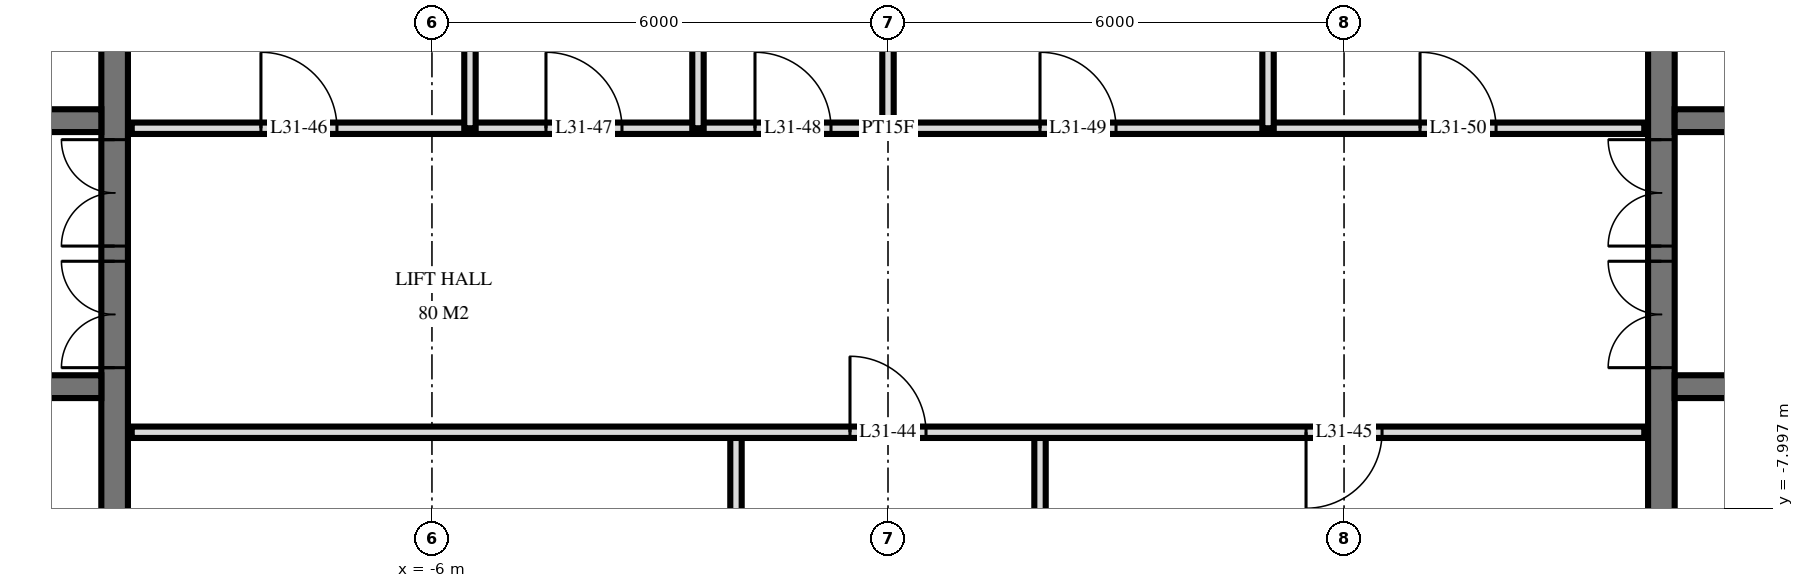
"""IFC4 building model, lengths in metres.
Left out: names, types, materials, properties, quantities, classifications, styles, units other than length and angle.
Written with IfcOpenShell. Run it as: python <this file> out.ifc"""

import sys

from ifc_helpers import new_model, si_unit, direction, frame, frame_2d, origin, place, context, subcontext, project, spatial, rectangle, extrude, element, fill, save


model = new_model("IFC4")
c1 = context("Model", 3, precision=1e-05, world=origin(), true_north=direction((0.0, 1.0)))
c2 = subcontext(c1, "Body", "Model", "MODEL_VIEW")
j1 = project(units=[si_unit("LENGTHUNIT", "METRE"), si_unit("PLANEANGLEUNIT", "RADIAN")], contexts=[c1])
p1 = place(None, origin())
s1 = spatial("IfcSite", under=j1, at=p1, CompositionType="ELEMENT")
p2 = place(p1, origin())
s2 = spatial("IfcBuilding", under=s1, at=p2, CompositionType="ELEMENT")
p3 = place(p2, frame((0.0, 0.0, 123.6)))
s3 = spatial("IfcBuildingStorey", under=s2, at=p3, CompositionType="ELEMENT", Elevation=123.6)
p4 = place(p3, frame((-10.175, -14.55, 0.0), z_axis=(0.0, 0.0, 1.0), x_axis=(0.0, 1.0, 0.0)))
e1 = element("IfcWall", 1, at=p4, inside=s3, PredefinedType="SHEAR", context=c2, shape_type="SweptSolid", body=[
    extrude(rectangle(XDim=14.1, YDim=0.35, at=frame_2d((7.05, 0.0))), origin(), (0.0, 0.0, 1.0), 3.6),
])
p5 = place(p4, frame((8.4, 0.0, 0.0)))
e2 = element("IfcOpeningElement", 2, at=p5, cuts=e1, PredefinedType="OPENING", context=c2, shape_type="SweptSolid", body=[
    extrude(rectangle(XDim=1.4, YDim=2.4, at=frame_2d((0.7, 1.2))), frame((0.0, 0.185, 0.0), z_axis=(0.0, -1.0, 0.0), x_axis=(1.0, 0.0, 0.0)), (0.0, 0.0, 1.0), 0.37),
])
p6 = place(p4, frame((10.0, 0.0, 0.0)))
e3 = element("IfcOpeningElement", 3, at=p6, cuts=e1, PredefinedType="OPENING", context=c2, shape_type="SweptSolid", body=[
    extrude(rectangle(XDim=1.4, YDim=2.4, at=frame_2d((0.7, 1.2))), frame((0.0, 0.185, 0.0), z_axis=(0.0, -1.0, 0.0), x_axis=(1.0, 0.0, 0.0)), (0.0, 0.0, 1.0), 0.37),
])
p7 = place(p4, frame((4.0, 0.0, 0.0)))
e4 = element("IfcOpeningElement", 4, at=p7, cuts=e1, PredefinedType="OPENING", context=c2, shape_type="SweptSolid", body=[
    extrude(rectangle(XDim=1.2, YDim=2.1, at=frame_2d((0.6, 1.05))), frame((0.0, 0.185, 0.0), z_axis=(0.0, -1.0, 0.0), x_axis=(1.0, 0.0, 0.0)), (0.0, 0.0, 1.0), 0.37),
])
p8 = place(p3, frame((-24.05, -2.9, 0.0), z_axis=(0.0, 0.0, 1.0), x_axis=(1.0, 0.0, 0.0)))
e5 = element("IfcWall", 5, at=p8, inside=s3, PredefinedType="SHEAR", context=c2, shape_type="SweptSolid", body=[
    extrude(rectangle(XDim=13.7, YDim=0.3, at=frame_2d((6.85, 0.0))), origin(), (0.0, 0.0, 1.0), 3.6),
])
p9 = place(p8, frame((0.55, 0.0, 0.0)))
e6 = element("IfcOpeningElement", 6, at=p9, cuts=e5, PredefinedType="OPENING", context=c2, shape_type="SweptSolid", body=[
    extrude(rectangle(XDim=1.1, YDim=2.1, at=frame_2d((0.55, 1.05))), frame((0.0, 0.16, 0.0), z_axis=(0.0, -1.0, 0.0), x_axis=(1.0, 0.0, 0.0)), (0.0, 0.0, 1.0), 0.32),
])
p10 = place(p8, frame((6.863, 0.0, 0.0)))
e7 = element("IfcOpeningElement", 7, at=p10, cuts=e5, PredefinedType="OPENING", context=c2, shape_type="SweptSolid", body=[
    extrude(rectangle(XDim=0.9, YDim=2.1, at=frame_2d((0.45, 1.05))), frame((0.0, 0.16, 0.0), z_axis=(0.0, -1.0, 0.0), x_axis=(1.0, 0.0, 0.0)), (0.0, 0.0, 1.0), 0.32),
])
p11 = place(p8, frame((5.438, 0.0, 0.0)))
e8 = element("IfcOpeningElement", 8, at=p11, cuts=e5, PredefinedType="OPENING", context=c2, shape_type="SweptSolid", body=[
    extrude(rectangle(XDim=0.9, YDim=2.1, at=frame_2d((0.45, 1.05))), frame((0.0, 0.16, 0.0), z_axis=(0.0, -1.0, 0.0), x_axis=(1.0, 0.0, 0.0)), (0.0, 0.0, 1.0), 0.32),
])
p12 = place(p8, frame((11.85, 0.0, 0.0)))
e9 = element("IfcOpeningElement", 9, at=p12, cuts=e5, PredefinedType="OPENING", context=c2, shape_type="SweptSolid", body=[
    extrude(rectangle(XDim=1.0, YDim=2.1, at=frame_2d((0.5, 1.05))), frame((0.0, 0.16, 0.0), z_axis=(0.0, -1.0, 0.0), x_axis=(1.0, 0.0, 0.0)), (0.0, 0.0, 1.0), 0.32),
])
p13 = place(p8, frame((9.562, 0.0, 0.0)))
e10 = element("IfcOpeningElement", 10, at=p13, cuts=e5, PredefinedType="OPENING", context=c2, shape_type="SweptSolid", body=[
    extrude(rectangle(XDim=1.0, YDim=2.1, at=frame_2d((0.5, 1.05))), frame((0.0, 0.16, 0.0), z_axis=(0.0, -1.0, 0.0), x_axis=(1.0, 0.0, 0.0)), (0.0, 0.0, 1.0), 0.32),
])
p14 = place(p8, frame((8.137, 0.0, 0.0)))
e11 = element("IfcOpeningElement", 11, at=p14, cuts=e5, PredefinedType="OPENING", context=c2, shape_type="SweptSolid", body=[
    extrude(rectangle(XDim=1.0, YDim=2.1, at=frame_2d((0.5, 1.05))), frame((0.0, 0.16, 0.0), z_axis=(0.0, -1.0, 0.0), x_axis=(1.0, 0.0, 0.0)), (0.0, 0.0, 1.0), 0.32),
])
p15 = place(p8, frame((3.0, 0.0, 0.0)))
e12 = element("IfcOpeningElement", 12, at=p15, cuts=e5, PredefinedType="OPENING", context=c2, shape_type="SweptSolid", body=[
    extrude(rectangle(XDim=1.0, YDim=2.1, at=frame_2d((0.5, 1.05))), frame((0.0, 0.16, 0.0), z_axis=(0.0, -1.0, 0.0), x_axis=(1.0, 0.0, 0.0)), (0.0, 0.0, 1.0), 0.32),
])
p16 = place(p3, frame((-24.05, -6.4, 0.0), z_axis=(0.0, 0.0, 1.0), x_axis=(1.0, 0.0, 0.0)))
e13 = element("IfcWall", 13, at=p16, inside=s3, PredefinedType="SHEAR", context=c2, shape_type="SweptSolid", body=[
    extrude(rectangle(XDim=13.7, YDim=0.3, at=frame_2d((6.85, 0.0))), origin(), (0.0, 0.0, 1.0), 3.6),
])
p17 = place(p16, frame((0.55, 0.0, 0.0)))
e14 = element("IfcOpeningElement", 14, at=p17, cuts=e13, PredefinedType="OPENING", context=c2, shape_type="SweptSolid", body=[
    extrude(rectangle(XDim=1.1, YDim=2.1, at=frame_2d((0.55, 1.05))), frame((0.0, 0.16, 0.0), z_axis=(0.0, -1.0, 0.0), x_axis=(1.0, 0.0, 0.0)), (0.0, 0.0, 1.0), 0.32),
])
p18 = place(p16, frame((5.8, 0.0, 0.0)))
e15 = element("IfcOpeningElement", 15, at=p18, cuts=e13, PredefinedType="OPENING", context=c2, shape_type="SweptSolid", body=[
    extrude(rectangle(XDim=1.1, YDim=2.1, at=frame_2d((0.55, 1.05))), frame((0.0, 0.16, 0.0), z_axis=(0.0, -1.0, 0.0), x_axis=(1.0, 0.0, 0.0)), (0.0, 0.0, 1.0), 0.32),
])
p19 = place(p3, frame((10.175, -14.55, 0.0), z_axis=(0.0, 0.0, 1.0), x_axis=(0.0, 1.0, 0.0)))
e16 = element("IfcWall", 16, at=p19, inside=s3, PredefinedType="SHEAR", context=c2, shape_type="SweptSolid", body=[
    extrude(rectangle(XDim=14.1, YDim=0.35, at=frame_2d((7.05, 0.0))), origin(), (0.0, 0.0, 1.0), 3.6),
])
p20 = place(p19, frame((8.4, 0.0, 0.0)))
e17 = element("IfcOpeningElement", 17, at=p20, cuts=e16, PredefinedType="OPENING", context=c2, shape_type="SweptSolid", body=[
    extrude(rectangle(XDim=1.4, YDim=2.4, at=frame_2d((0.7, 1.2))), frame((0.0, 0.185, 0.0), z_axis=(0.0, -1.0, 0.0), x_axis=(1.0, 0.0, 0.0)), (0.0, 0.0, 1.0), 0.37),
])
p21 = place(p19, frame((10.0, 0.0, 0.0)))
e18 = element("IfcOpeningElement", 18, at=p21, cuts=e16, PredefinedType="OPENING", context=c2, shape_type="SweptSolid", body=[
    extrude(rectangle(XDim=1.4, YDim=2.4, at=frame_2d((0.7, 1.2))), frame((0.0, 0.185, 0.0), z_axis=(0.0, -1.0, 0.0), x_axis=(1.0, 0.0, 0.0)), (0.0, 0.0, 1.0), 0.37),
])
p22 = place(p19, frame((4.0, 0.0, 0.0)))
e19 = element("IfcOpeningElement", 19, at=p22, cuts=e16, PredefinedType="OPENING", context=c2, shape_type="SweptSolid", body=[
    extrude(rectangle(XDim=1.2, YDim=2.1, at=frame_2d((0.6, 1.05))), frame((0.0, 0.185, 0.0), z_axis=(0.0, -1.0, 0.0), x_axis=(1.0, 0.0, 0.0)), (0.0, 0.0, 1.0), 0.37),
])
p23 = place(p3, frame((10.35, -2.9, 0.0), z_axis=(0.0, 0.0, 1.0), x_axis=(1.0, 0.0, 0.0)))
e20 = element("IfcWall", 20, at=p23, inside=s3, PredefinedType="SHEAR", context=c2, shape_type="SweptSolid", body=[
    extrude(rectangle(XDim=13.7, YDim=0.3, at=frame_2d((6.85, 0.0))), origin(), (0.0, 0.0, 1.0), 3.6),
])
p24 = place(p23, frame((12.05, 0.0, 0.0)))
e21 = element("IfcOpeningElement", 21, at=p24, cuts=e20, PredefinedType="OPENING", context=c2, shape_type="SweptSolid", body=[
    extrude(rectangle(XDim=1.1, YDim=2.1, at=frame_2d((0.55, 1.05))), frame((0.0, 0.16, 0.0), z_axis=(0.0, -1.0, 0.0), x_axis=(1.0, 0.0, 0.0)), (0.0, 0.0, 1.0), 0.32),
])
p25 = place(p23, frame((5.938, 0.0, 0.0)))
e22 = element("IfcOpeningElement", 22, at=p25, cuts=e20, PredefinedType="OPENING", context=c2, shape_type="SweptSolid", body=[
    extrude(rectangle(XDim=0.9, YDim=2.1, at=frame_2d((0.45, 1.05))), frame((0.0, 0.16, 0.0), z_axis=(0.0, -1.0, 0.0), x_axis=(1.0, 0.0, 0.0)), (0.0, 0.0, 1.0), 0.32),
])
p26 = place(p23, frame((7.363, 0.0, 0.0)))
e23 = element("IfcOpeningElement", 23, at=p26, cuts=e20, PredefinedType="OPENING", context=c2, shape_type="SweptSolid", body=[
    extrude(rectangle(XDim=0.9, YDim=2.1, at=frame_2d((0.45, 1.05))), frame((0.0, 0.16, 0.0), z_axis=(0.0, -1.0, 0.0), x_axis=(1.0, 0.0, 0.0)), (0.0, 0.0, 1.0), 0.32),
])
p27 = place(p23, frame((0.85, 0.0, 0.0)))
e24 = element("IfcOpeningElement", 24, at=p27, cuts=e20, PredefinedType="OPENING", context=c2, shape_type="SweptSolid", body=[
    extrude(rectangle(XDim=1.0, YDim=2.1, at=frame_2d((0.5, 1.05))), frame((0.0, 0.16, 0.0), z_axis=(0.0, -1.0, 0.0), x_axis=(1.0, 0.0, 0.0)), (0.0, 0.0, 1.0), 0.32),
])
p28 = place(p23, frame((3.137, 0.0, 0.0)))
e25 = element("IfcOpeningElement", 25, at=p28, cuts=e20, PredefinedType="OPENING", context=c2, shape_type="SweptSolid", body=[
    extrude(rectangle(XDim=1.0, YDim=2.1, at=frame_2d((0.5, 1.05))), frame((0.0, 0.16, 0.0), z_axis=(0.0, -1.0, 0.0), x_axis=(1.0, 0.0, 0.0)), (0.0, 0.0, 1.0), 0.32),
])
p29 = place(p23, frame((4.562, 0.0, 0.0)))
e26 = element("IfcOpeningElement", 26, at=p29, cuts=e20, PredefinedType="OPENING", context=c2, shape_type="SweptSolid", body=[
    extrude(rectangle(XDim=1.0, YDim=2.1, at=frame_2d((0.5, 1.05))), frame((0.0, 0.16, 0.0), z_axis=(0.0, -1.0, 0.0), x_axis=(1.0, 0.0, 0.0)), (0.0, 0.0, 1.0), 0.32),
])
p30 = place(p23, frame((9.7, 0.0, 0.0)))
e27 = element("IfcOpeningElement", 27, at=p30, cuts=e20, PredefinedType="OPENING", context=c2, shape_type="SweptSolid", body=[
    extrude(rectangle(XDim=1.0, YDim=2.1, at=frame_2d((0.5, 1.05))), frame((0.0, 0.16, 0.0), z_axis=(0.0, -1.0, 0.0), x_axis=(1.0, 0.0, 0.0)), (0.0, 0.0, 1.0), 0.32),
])
p31 = place(p3, frame((10.35, -6.4, 0.0), z_axis=(0.0, 0.0, 1.0), x_axis=(1.0, 0.0, 0.0)))
e28 = element("IfcWall", 28, at=p31, inside=s3, PredefinedType="SHEAR", context=c2, shape_type="SweptSolid", body=[
    extrude(rectangle(XDim=13.7, YDim=0.3, at=frame_2d((6.85, 0.0))), origin(), (0.0, 0.0, 1.0), 3.6),
])
p32 = place(p31, frame((12.05, 0.0, 0.0)))
e29 = element("IfcOpeningElement", 29, at=p32, cuts=e28, PredefinedType="OPENING", context=c2, shape_type="SweptSolid", body=[
    extrude(rectangle(XDim=1.1, YDim=2.1, at=frame_2d((0.55, 1.05))), frame((0.0, 0.16, 0.0), z_axis=(0.0, -1.0, 0.0), x_axis=(1.0, 0.0, 0.0)), (0.0, 0.0, 1.0), 0.32),
])
p33 = place(p31, frame((6.8, 0.0, 0.0)))
e30 = element("IfcOpeningElement", 30, at=p33, cuts=e28, PredefinedType="OPENING", context=c2, shape_type="SweptSolid", body=[
    extrude(rectangle(XDim=1.1, YDim=2.1, at=frame_2d((0.55, 1.05))), frame((0.0, 0.16, 0.0), z_axis=(0.0, -1.0, 0.0), x_axis=(1.0, 0.0, 0.0)), (0.0, 0.0, 1.0), 0.32),
])
p34 = place(p3, frame((5.0, -3.0, 0.0), z_axis=(0.0, 0.0, 1.0), x_axis=(0.0, 1.0, 0.0)))
e31 = element("IfcWall", 31, at=p34, inside=s3, PredefinedType="PARTITIONING", context=c2, shape_type="SweptSolid", body=[
    extrude(rectangle(XDim=4.02, YDim=0.15, at=frame_2d((2.01, 0.0))), origin(), (0.0, 0.0, 1.0), 3.32),
])
p35 = place(p3, frame((2.0, -11.0, 0.0), z_axis=(0.0, 0.0, 1.0), x_axis=(0.0, 1.0, 0.0)))
e32 = element("IfcWall", 32, at=p35, inside=s3, PredefinedType="PARTITIONING", context=c2, shape_type="SweptSolid", body=[
    extrude(rectangle(XDim=4.0, YDim=0.15, at=frame_2d((2.0, 0.0))), origin(), (0.0, 0.0, 1.0), 3.32),
])
p36 = place(p3, frame((0.0, -3.0, 0.0), z_axis=(0.0, 0.0, 1.0), x_axis=(0.0, 1.0, 0.0)))
e33 = element("IfcWall", 33, at=p36, inside=s3, PredefinedType="PLUMBINGWALL", context=c2, shape_type="SweptSolid", body=[
    extrude(rectangle(XDim=4.02, YDim=0.15, at=frame_2d((2.01, 0.0))), origin(), (0.0, 0.0, 1.0), 3.32),
])
p37 = place(p3, frame((-2.0, -11.0, 0.0), z_axis=(0.0, 0.0, 1.0), x_axis=(0.0, 1.0, 0.0)))
e34 = element("IfcWall", 34, at=p37, inside=s3, PredefinedType="PARTITIONING", context=c2, shape_type="SweptSolid", body=[
    extrude(rectangle(XDim=4.0, YDim=0.15, at=frame_2d((2.0, 0.0))), origin(), (0.0, 0.0, 1.0), 3.32),
])
for number, where, z_axis, x_axis in (
    (35, (-2.5, -3.0, 0.0), (0.0, 0.0, 1.0), (0.0, 1.0, 0.0)),
    (36, (-5.5, -3.0, 0.0), (0.0, 0.0, 1.0), (0.0, 1.0, 0.0)),
):
    element("IfcWall", number, at=place(p3, frame(where, z_axis=z_axis, x_axis=x_axis)), inside=s3, PredefinedType="PLUMBINGWALL", context=c2, shape_type="SweptSolid", body=[
        extrude(rectangle(XDim=4.02, YDim=0.15, at=frame_2d((2.01, 0.0))), origin(), (0.0, 0.0, 1.0), 3.32),
    ])
p38 = place(p3, frame((-9.95, -7.0, 0.0), z_axis=(0.0, 0.0, 1.0), x_axis=(1.0, 0.0, 0.0)))
e37 = element("IfcWall", 37, at=p38, inside=s3, PredefinedType="PARTITIONING", context=c2, shape_type="SweptSolid", body=[
    extrude(rectangle(XDim=19.9, YDim=0.15, at=frame_2d((9.95, 0.0))), origin(), (0.0, 0.0, 1.0), 3.32),
])
p39 = place(p38, frame((9.45, 0.0, 0.0)))
e38 = element("IfcOpeningElement", 38, at=p39, cuts=e37, PredefinedType="OPENING", context=c2, shape_type="SweptSolid", body=[
    extrude(rectangle(XDim=1.0, YDim=2.1, at=frame_2d((0.5, 1.05))), frame((0.0, 0.085, 0.0), z_axis=(0.0, -1.0, 0.0), x_axis=(1.0, 0.0, 0.0)), (0.0, 0.0, 1.0), 0.17),
])
p40 = place(p38, frame((15.45, 0.0, 0.0)))
e39 = element("IfcOpeningElement", 39, at=p40, cuts=e37, PredefinedType="OPENING", context=c2, shape_type="SweptSolid", body=[
    extrude(rectangle(XDim=1.0, YDim=2.1, at=frame_2d((0.5, 1.05))), frame((0.0, 0.085, 0.0), z_axis=(0.0, -1.0, 0.0), x_axis=(1.0, 0.0, 0.0)), (0.0, 0.0, 1.0), 0.17),
])
p41 = place(p3, frame((-9.95, -3.0, 0.0), z_axis=(0.0, 0.0, 1.0), x_axis=(1.0, 0.0, 0.0)))
e40 = element("IfcWall", 40, at=p41, inside=s3, PredefinedType="PARTITIONING", context=c2, shape_type="SweptSolid", body=[
    extrude(rectangle(XDim=19.9, YDim=0.15, at=frame_2d((9.95, 0.0))), origin(), (0.0, 0.0, 1.0), 3.32),
])
p42 = place(p41, frame((1.7, 0.0, 0.0)))
e41 = element("IfcOpeningElement", 41, at=p42, cuts=e40, PredefinedType="OPENING", context=c2, shape_type="SweptSolid", body=[
    extrude(rectangle(XDim=1.0, YDim=2.1, at=frame_2d((0.5, 1.05))), frame((0.0, 0.085, 0.0), z_axis=(0.0, -1.0, 0.0), x_axis=(1.0, 0.0, 0.0)), (0.0, 0.0, 1.0), 0.17),
])
p43 = place(p41, frame((5.45, 0.0, 0.0)))
e42 = element("IfcOpeningElement", 42, at=p43, cuts=e40, PredefinedType="OPENING", context=c2, shape_type="SweptSolid", body=[
    extrude(rectangle(XDim=1.0, YDim=2.1, at=frame_2d((0.5, 1.05))), frame((0.0, 0.085, 0.0), z_axis=(0.0, -1.0, 0.0), x_axis=(1.0, 0.0, 0.0)), (0.0, 0.0, 1.0), 0.17),
])
p44 = place(p41, frame((8.2, 0.0, 0.0)))
e43 = element("IfcOpeningElement", 43, at=p44, cuts=e40, PredefinedType="OPENING", context=c2, shape_type="SweptSolid", body=[
    extrude(rectangle(XDim=1.0, YDim=2.1, at=frame_2d((0.5, 1.05))), frame((0.0, 0.085, 0.0), z_axis=(0.0, -1.0, 0.0), x_axis=(1.0, 0.0, 0.0)), (0.0, 0.0, 1.0), 0.17),
])
p45 = place(p41, frame((11.95, 0.0, 0.0)))
e44 = element("IfcOpeningElement", 44, at=p45, cuts=e40, PredefinedType="OPENING", context=c2, shape_type="SweptSolid", body=[
    extrude(rectangle(XDim=1.0, YDim=2.1, at=frame_2d((0.5, 1.05))), frame((0.0, 0.085, 0.0), z_axis=(0.0, -1.0, 0.0), x_axis=(1.0, 0.0, 0.0)), (0.0, 0.0, 1.0), 0.17),
])
p46 = place(p41, frame((16.95, 0.0, 0.0)))
e45 = element("IfcOpeningElement", 45, at=p46, cuts=e40, PredefinedType="OPENING", context=c2, shape_type="SweptSolid", body=[
    extrude(rectangle(XDim=1.0, YDim=2.1, at=frame_2d((0.5, 1.05))), frame((0.0, 0.085, 0.0), z_axis=(0.0, -1.0, 0.0), x_axis=(1.0, 0.0, 0.0)), (0.0, 0.0, 1.0), 0.17),
])
p47 = place(p5, origin())
e46 = element("IfcDoor", 46, at=p47, inside=s3, OperationType="DOUBLE_DOOR_SINGLE_SWING", PredefinedType="DOOR", context=c2, shape_type="SweptSolid", body=[
    extrude(rectangle(XDim=1.4, YDim=2.4, at=frame_2d((0.7, 1.2))), frame((0.0, 0.025, 0.0), z_axis=(0.0, -1.0, 0.0), x_axis=(1.0, 0.0, 0.0)), (0.0, 0.0, 1.0), 0.05),
])
fill(e2, e46)
p48 = place(p6, origin())
e47 = element("IfcDoor", 47, at=p48, inside=s3, OperationType="DOUBLE_DOOR_SINGLE_SWING", PredefinedType="DOOR", context=c2, shape_type="SweptSolid", body=[
    extrude(rectangle(XDim=1.4, YDim=2.4, at=frame_2d((0.7, 1.2))), frame((0.0, 0.025, 0.0), z_axis=(0.0, -1.0, 0.0), x_axis=(1.0, 0.0, 0.0)), (0.0, 0.0, 1.0), 0.05),
])
fill(e3, e47)
p49 = place(p20, origin())
e48 = element("IfcDoor", 48, at=p49, inside=s3, OperationType="DOUBLE_DOOR_SINGLE_SWING", PredefinedType="DOOR", context=c2, shape_type="SweptSolid", body=[
    extrude(rectangle(XDim=1.4, YDim=2.4, at=frame_2d((0.7, 1.2))), frame((0.0, 0.025, 0.0), z_axis=(0.0, -1.0, 0.0), x_axis=(1.0, 0.0, 0.0)), (0.0, 0.0, 1.0), 0.05),
])
fill(e17, e48)
p50 = place(p21, origin())
e49 = element("IfcDoor", 49, at=p50, inside=s3, OperationType="DOUBLE_DOOR_SINGLE_SWING", PredefinedType="DOOR", context=c2, shape_type="SweptSolid", body=[
    extrude(rectangle(XDim=1.4, YDim=2.4, at=frame_2d((0.7, 1.2))), frame((0.0, 0.025, 0.0), z_axis=(0.0, -1.0, 0.0), x_axis=(1.0, 0.0, 0.0)), (0.0, 0.0, 1.0), 0.05),
])
fill(e18, e49)
p51 = place(p39, origin())
e50 = element("IfcDoor", 50, at=p51, inside=s3, OperationType="SINGLE_SWING_RIGHT", PredefinedType="DOOR", context=c2, shape_type="SweptSolid", body=[
    extrude(rectangle(XDim=1.0, YDim=2.1, at=frame_2d((0.5, 1.05))), frame((0.0, 0.025, 0.0), z_axis=(0.0, -1.0, 0.0), x_axis=(1.0, 0.0, 0.0)), (0.0, 0.0, 1.0), 0.05),
])
fill(e38, e50)
p52 = place(p40, frame((0.5, 0.0, 0.0), z_axis=(0.0, 0.0, 1.0), x_axis=(-1.0, 0.0, 0.0)))
e51 = element("IfcDoor", 51, at=p52, inside=s3, OperationType="SINGLE_SWING_LEFT", PredefinedType="DOOR", context=c2, shape_type="SweptSolid", body=[
    extrude(rectangle(XDim=1.0, YDim=2.1, at=frame_2d((0.0, 1.05))), frame((0.0, -0.025, 0.0), z_axis=(0.0, 1.0, 0.0), x_axis=(-1.0, 0.0, 0.0)), (0.0, 0.0, 1.0), 0.05),
])
fill(e39, e51)
p53 = place(p42, origin())
e52 = element("IfcDoor", 52, at=p53, inside=s3, OperationType="SINGLE_SWING_RIGHT", PredefinedType="DOOR", context=c2, shape_type="SweptSolid", body=[
    extrude(rectangle(XDim=1.0, YDim=2.1, at=frame_2d((0.5, 1.05))), frame((0.0, 0.025, 0.0), z_axis=(0.0, -1.0, 0.0), x_axis=(1.0, 0.0, 0.0)), (0.0, 0.0, 1.0), 0.05),
])
fill(e41, e52)
p54 = place(p43, origin())
e53 = element("IfcDoor", 53, at=p54, inside=s3, OperationType="SINGLE_SWING_RIGHT", PredefinedType="DOOR", context=c2, shape_type="SweptSolid", body=[
    extrude(rectangle(XDim=1.0, YDim=2.1, at=frame_2d((0.5, 1.05))), frame((0.0, 0.025, 0.0), z_axis=(0.0, -1.0, 0.0), x_axis=(1.0, 0.0, 0.0)), (0.0, 0.0, 1.0), 0.05),
])
fill(e42, e53)
p55 = place(p44, origin())
e54 = element("IfcDoor", 54, at=p55, inside=s3, OperationType="SINGLE_SWING_RIGHT", PredefinedType="DOOR", context=c2, shape_type="SweptSolid", body=[
    extrude(rectangle(XDim=1.0, YDim=2.1, at=frame_2d((0.5, 1.05))), frame((0.0, 0.025, 0.0), z_axis=(0.0, -1.0, 0.0), x_axis=(1.0, 0.0, 0.0)), (0.0, 0.0, 1.0), 0.05),
])
fill(e43, e54)
p56 = place(p45, origin())
e55 = element("IfcDoor", 55, at=p56, inside=s3, OperationType="SINGLE_SWING_RIGHT", PredefinedType="DOOR", context=c2, shape_type="SweptSolid", body=[
    extrude(rectangle(XDim=1.0, YDim=2.1, at=frame_2d((0.5, 1.05))), frame((0.0, 0.025, 0.0), z_axis=(0.0, -1.0, 0.0), x_axis=(1.0, 0.0, 0.0)), (0.0, 0.0, 1.0), 0.05),
])
fill(e44, e55)
p57 = place(p46, origin())
e56 = element("IfcDoor", 56, at=p57, inside=s3, OperationType="SINGLE_SWING_RIGHT", PredefinedType="DOOR", context=c2, shape_type="SweptSolid", body=[
    extrude(rectangle(XDim=1.0, YDim=2.1, at=frame_2d((0.5, 1.05))), frame((0.0, 0.025, 0.0), z_axis=(0.0, -1.0, 0.0), x_axis=(1.0, 0.0, 0.0)), (0.0, 0.0, 1.0), 0.05),
])
fill(e45, e56)
save(model, sys.argv[1])
